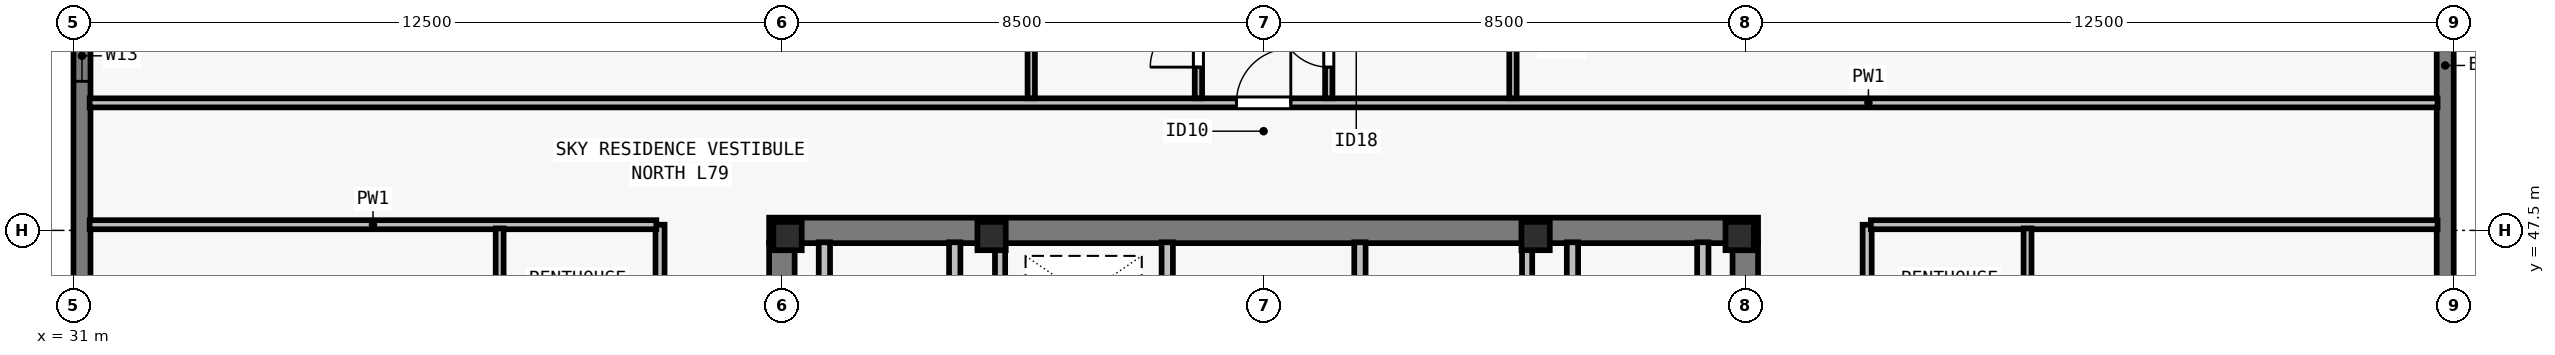
"""IFC4 building model, lengths in metres.
Left out: names, types, materials, properties, quantities, classifications, styles, units other than length and angle.
Written with IfcOpenShell. Run it as: python <this file> out.ifc"""

import sys

from ifc_helpers import new_model, si_unit, direction, frame, frame_2d, origin, origin_2d, place, context, subcontext, project, spatial, rectangle, i_section, extrude, element, fill, save


model = new_model("IFC4")
c1 = context("Model", 3, precision=1e-05, world=origin(), true_north=direction((0.0, 1.0)))
c2 = subcontext(c1, "Body", "Model", "MODEL_VIEW")
j1 = project(units=[si_unit("LENGTHUNIT", "METRE"), si_unit("PLANEANGLEUNIT", "RADIAN")], contexts=[c1])
p1 = place(None, origin())
s1 = spatial("IfcSite", under=j1, at=p1, CompositionType="ELEMENT")
p2 = place(p1, origin())
s2 = spatial("IfcBuilding", under=s1, at=p2, CompositionType="ELEMENT")
p3 = place(p2, frame((0.0, 0.0, 287.5)))
s3 = spatial("IfcBuildingStorey", under=s2, at=p3, CompositionType="ELEMENT", Elevation=287.5)
for number, where, z_axis, x_axis in (
    (1, (43.6, 47.4, 0.0), (0.0, 0.0, 1.0), (1.0, 0.0, 0.0)),
    (2, (47.2, 47.4, 0.0), (0.0, 0.0, 1.0), (1.0, 0.0, 0.0)),
    (3, (56.8, 47.4, 0.0), (0.0, 0.0, 1.0), (1.0, 0.0, 0.0)),
    (4, (60.4, 47.4, 0.0), (0.0, 0.0, 1.0), (1.0, 0.0, 0.0)),
):
    element("IfcColumn", number, at=place(p3, frame(where, z_axis=z_axis, x_axis=x_axis)), inside=s3, PredefinedType="COLUMN", context=c2, shape_type="SweptSolid", body=[
        extrude(i_section(OverallWidth=0.5, OverallDepth=0.5, WebThickness=0.028, FlangeThickness=0.045, at=origin_2d()), origin(), (0.0, 0.0, 1.0), 3.5),
    ])
p4 = place(p3, frame((31.15, 23.5, 0.0), z_axis=(0.0, 0.0, 1.0), x_axis=(0.0, 1.0, 0.0)))
e5 = element("IfcWall", 5, at=p4, inside=s3, PredefinedType="SOLIDWALL", context=c2, shape_type="SweptSolid", body=[
    extrude(rectangle(XDim=30.722, YDim=0.3, at=frame_2d((15.361, 0.0))), origin(), (0.0, 0.0, 1.0), 3.29),
])
p5 = place(p4, frame((8.331, 0.0, 0.8)))
e6 = element("IfcOpeningElement", 6, at=p5, cuts=e5, PredefinedType="OPENING", context=c2, shape_type="SweptSolid", body=[
    extrude(rectangle(XDim=1.65, YDim=1.758, at=frame_2d((0.825, 0.879))), frame((0.0, 0.16, 0.0), z_axis=(0.0, -1.0, 0.0), x_axis=(1.0, 0.0, 0.0)), (0.0, 0.0, 1.0), 0.32),
])
p6 = place(p4, frame((12.442, 0.0, 0.8)))
e7 = element("IfcOpeningElement", 7, at=p6, cuts=e5, PredefinedType="OPENING", context=c2, shape_type="SweptSolid", body=[
    extrude(rectangle(XDim=2.0, YDim=1.758, at=frame_2d((1.0, 0.879))), frame((0.0, 0.16, 0.0), z_axis=(0.0, -1.0, 0.0), x_axis=(1.0, 0.0, 0.0)), (0.0, 0.0, 1.0), 0.32),
])
p7 = place(p4, frame((17.304, 0.0, 0.8)))
e8 = element("IfcOpeningElement", 8, at=p7, cuts=e5, PredefinedType="OPENING", context=c2, shape_type="SweptSolid", body=[
    extrude(rectangle(XDim=1.65, YDim=1.758, at=frame_2d((0.825, 0.879))), frame((0.0, 0.16, 0.0), z_axis=(0.0, -1.0, 0.0), x_axis=(1.0, 0.0, 0.0)), (0.0, 0.0, 1.0), 0.32),
])
p8 = place(p4, frame((20.967, 0.0, 0.8)))
e9 = element("IfcOpeningElement", 9, at=p8, cuts=e5, PredefinedType="OPENING", context=c2, shape_type="SweptSolid", body=[
    extrude(rectangle(XDim=2.0, YDim=1.758, at=frame_2d((1.0, 0.879))), frame((0.0, 0.16, 0.0), z_axis=(0.0, -1.0, 0.0), x_axis=(1.0, 0.0, 0.0)), (0.0, 0.0, 1.0), 0.32),
])
p9 = place(p4, frame((26.63, 0.0, 0.8)))
e10 = element("IfcOpeningElement", 10, at=p9, cuts=e5, PredefinedType="OPENING", context=c2, shape_type="SweptSolid", body=[
    extrude(rectangle(XDim=0.9, YDim=1.75, at=frame_2d((0.45, 0.875))), frame((0.0, 0.16, 0.0), z_axis=(0.0, -1.0, 0.0), x_axis=(1.0, 0.0, 0.0)), (0.0, 0.0, 1.0), 0.32),
])
p10 = place(p3, frame((72.85, 54.5, 0.0), z_axis=(0.0, 0.0, 1.0), x_axis=(0.0, -1.0, 0.0)))
e11 = element("IfcWall", 11, at=p10, inside=s3, PredefinedType="SOLIDWALL", context=c2, shape_type="SweptSolid", body=[
    extrude(rectangle(XDim=30.722, YDim=0.3, at=frame_2d((15.361, 0.0))), origin(), (0.0, 0.0, 1.0), 3.29),
])
p11 = place(p10, frame((8.331, 0.0, 0.8)))
e12 = element("IfcOpeningElement", 12, at=p11, cuts=e11, PredefinedType="OPENING", context=c2, shape_type="SweptSolid", body=[
    extrude(rectangle(XDim=1.65, YDim=1.758, at=frame_2d((0.825, 0.879))), frame((0.0, 0.16, 0.0), z_axis=(0.0, -1.0, 0.0), x_axis=(1.0, 0.0, 0.0)), (0.0, 0.0, 1.0), 0.32),
])
p12 = place(p10, frame((11.593, 0.0, 0.8)))
e13 = element("IfcOpeningElement", 13, at=p12, cuts=e11, PredefinedType="OPENING", context=c2, shape_type="SweptSolid", body=[
    extrude(rectangle(XDim=2.0, YDim=1.758, at=frame_2d((1.0, 0.879))), frame((0.0, 0.16, 0.0), z_axis=(0.0, -1.0, 0.0), x_axis=(1.0, 0.0, 0.0)), (0.0, 0.0, 1.0), 0.32),
])
p13 = place(p10, frame((16.455, 0.0, 0.8)))
e14 = element("IfcOpeningElement", 14, at=p13, cuts=e11, PredefinedType="OPENING", context=c2, shape_type="SweptSolid", body=[
    extrude(rectangle(XDim=1.65, YDim=1.758, at=frame_2d((0.825, 0.879))), frame((0.0, 0.16, 0.0), z_axis=(0.0, -1.0, 0.0), x_axis=(1.0, 0.0, 0.0)), (0.0, 0.0, 1.0), 0.32),
])
p14 = place(p10, frame((20.967, 0.0, 0.8)))
e15 = element("IfcOpeningElement", 15, at=p14, cuts=e11, PredefinedType="OPENING", context=c2, shape_type="SweptSolid", body=[
    extrude(rectangle(XDim=2.0, YDim=1.758, at=frame_2d((1.0, 0.879))), frame((0.0, 0.16, 0.0), z_axis=(0.0, -1.0, 0.0), x_axis=(1.0, 0.0, 0.0)), (0.0, 0.0, 1.0), 0.32),
])
p15 = place(p3, frame((43.275, 47.5, 0.0), z_axis=(0.0, 0.0, 1.0), x_axis=(1.0, 0.0, 0.0)))
e16 = element("IfcWall", 16, at=p15, inside=s3, PredefinedType="SHEAR", context=c2, shape_type="SweptSolid", body=[
    extrude(rectangle(XDim=17.45, YDim=0.45, at=frame_2d((8.725, 0.0))), origin(), (0.0, 0.0, 1.0), 3.29),
])
for number, where, z_axis, x_axis in (
    (17, (43.5, 40.8, 0.0), (0.0, 0.0, 1.0), (0.0, 1.0, 0.0)),
    (18, (60.5, 40.8, 0.0), (0.0, 0.0, 1.0), (0.0, 1.0, 0.0)),
):
    element("IfcWall", number, at=place(p3, frame(where, z_axis=z_axis, x_axis=x_axis)), inside=s3, PredefinedType="SHEAR", context=c2, shape_type="SweptSolid", body=[
        extrude(rectangle(XDim=6.485, YDim=0.45, at=frame_2d((3.242, 0.0))), origin(), (0.0, 0.0, 1.0), 3.29),
    ])
p16 = place(p3, frame((50.3, 40.585, 0.0), z_axis=(0.0, 0.0, 1.0), x_axis=(0.0, 1.0, 0.0)))
e19 = element("IfcWall", 19, at=p16, inside=s3, PredefinedType="SOLIDWALL", context=c2, shape_type="SweptSolid", body=[
    extrude(rectangle(XDim=6.705, YDim=0.2, at=frame_2d((3.353, 0.0))), origin(), (0.0, 0.0, 1.0), 3.29),
])
p17 = place(p16, frame((0.515, 0.0, 0.0)))
e20 = element("IfcOpeningElement", 20, at=p17, cuts=e19, PredefinedType="OPENING", context=c2, shape_type="SweptSolid", body=[
    extrude(rectangle(XDim=1.1, YDim=2.2, at=frame_2d((0.55, 1.1))), frame((0.0, 0.11, 0.0), z_axis=(0.0, -1.0, 0.0), x_axis=(1.0, 0.0, 0.0)), (0.0, 0.0, 1.0), 0.22),
])
p18 = place(p16, frame((3.015, 0.0, 0.0)))
e21 = element("IfcOpeningElement", 21, at=p18, cuts=e19, PredefinedType="OPENING", context=c2, shape_type="SweptSolid", body=[
    extrude(rectangle(XDim=1.1, YDim=2.2, at=frame_2d((0.55, 1.1))), frame((0.0, 0.11, 0.0), z_axis=(0.0, -1.0, 0.0), x_axis=(1.0, 0.0, 0.0)), (0.0, 0.0, 1.0), 0.22),
])
p19 = place(p16, frame((5.065, 0.0, 0.0)))
e22 = element("IfcOpeningElement", 22, at=p19, cuts=e19, PredefinedType="OPENING", context=c2, shape_type="SweptSolid", body=[
    extrude(rectangle(XDim=0.8, YDim=2.08, at=frame_2d((0.4, 1.04))), frame((0.0, 0.11, 0.0), z_axis=(0.0, -1.0, 0.0), x_axis=(1.0, 0.0, 0.0)), (0.0, 0.0, 1.0), 0.22),
])
p20 = place(p3, frame((53.7, 40.585, 0.0), z_axis=(0.0, 0.0, 1.0), x_axis=(0.0, 1.0, 0.0)))
e23 = element("IfcWall", 23, at=p20, inside=s3, PredefinedType="SOLIDWALL", context=c2, shape_type="SweptSolid", body=[
    extrude(rectangle(XDim=6.705, YDim=0.2, at=frame_2d((3.353, 0.0))), origin(), (0.0, 0.0, 1.0), 3.29),
])
p21 = place(p20, frame((0.195, 0.0, 0.0)))
e24 = element("IfcOpeningElement", 24, at=p21, cuts=e23, PredefinedType="OPENING", context=c2, shape_type="SweptSolid", body=[
    extrude(rectangle(XDim=0.8, YDim=2.08, at=frame_2d((0.4, 1.04))), frame((0.0, 0.11, 0.0), z_axis=(0.0, -1.0, 0.0), x_axis=(1.0, 0.0, 0.0)), (0.0, 0.0, 1.0), 0.22),
])
p22 = place(p20, frame((1.865, 0.0, 0.0)))
e25 = element("IfcOpeningElement", 25, at=p22, cuts=e23, PredefinedType="OPENING", context=c2, shape_type="SweptSolid", body=[
    extrude(rectangle(XDim=1.1, YDim=2.2, at=frame_2d((0.55, 1.1))), frame((0.0, 0.11, 0.0), z_axis=(0.0, -1.0, 0.0), x_axis=(1.0, 0.0, 0.0)), (0.0, 0.0, 1.0), 0.22),
])
p23 = place(p20, frame((4.265, 0.0, 0.0)))
e26 = element("IfcOpeningElement", 26, at=p23, cuts=e23, PredefinedType="OPENING", context=c2, shape_type="SweptSolid", body=[
    extrude(rectangle(XDim=0.95, YDim=2.12, at=frame_2d((0.475, 1.06))), frame((0.0, 0.11, 0.0), z_axis=(0.0, -1.0, 0.0), x_axis=(1.0, 0.0, 0.0)), (0.0, 0.0, 1.0), 0.22),
])
for number, where, z_axis, x_axis in (
    (27, (46.55, 43.735, 0.0), (0.0, 0.0, 1.0), (0.0, 1.0, 0.0)),
    (28, (44.25, 43.735, 0.0), (0.0, 0.0, 1.0), (0.0, 1.0, 0.0)),
    (29, (57.45, 43.735, 0.0), (0.0, 0.0, 1.0), (0.0, 1.0, 0.0)),
    (30, (59.75, 43.735, 0.0), (0.0, 0.0, 1.0), (0.0, 1.0, 0.0)),
):
    element("IfcWall", number, at=place(p3, frame(where, z_axis=z_axis, x_axis=x_axis)), inside=s3, PredefinedType="SOLIDWALL", context=c2, shape_type="SweptSolid", body=[
        extrude(rectangle(XDim=3.555, YDim=0.2, at=frame_2d((1.777, 0.0))), origin(), (0.0, 0.0, 1.0), 3.29),
    ])
for number, where, z_axis, x_axis in (
    (31, (47.35, 43.735, 0.0), (0.0, 0.0, 1.0), (0.0, 1.0, 0.0)),
    (32, (56.65, 43.735, 0.0), (0.0, 0.0, 1.0), (0.0, 1.0, 0.0)),
):
    element("IfcWall", number, at=place(p3, frame(where, z_axis=z_axis, x_axis=x_axis)), inside=s3, PredefinedType="SOLIDWALL", context=c2, shape_type="SweptSolid", body=[
        extrude(rectangle(XDim=3.555, YDim=0.18, at=frame_2d((1.777, 0.0))), origin(), (0.0, 0.0, 1.0), 3.29),
    ])
p24 = place(p3, frame((31.285, 49.75, 0.0), z_axis=(0.0, 0.0, 1.0), x_axis=(1.0, 0.0, 0.0)))
e33 = element("IfcWall", 33, at=p24, inside=s3, PredefinedType="PARTITIONING", context=c2, shape_type="SweptSolid", body=[
    extrude(rectangle(XDim=41.43, YDim=0.16, at=frame_2d((20.715, 0.0))), origin(), (0.0, 0.0, 1.0), 3.009),
])
p25 = place(p24, frame((20.235, 0.0, 0.0)))
e34 = element("IfcOpeningElement", 34, at=p25, cuts=e33, PredefinedType="OPENING", context=c2, shape_type="SweptSolid", body=[
    extrude(rectangle(XDim=0.96, YDim=2.18, at=frame_2d((0.48, 1.09))), frame((0.0, 0.09, 0.0), z_axis=(0.0, -1.0, 0.0), x_axis=(1.0, 0.0, 0.0)), (0.0, 0.0, 1.0), 0.18),
])
p26 = place(p3, frame((41.35, 30.4, 0.0), z_axis=(0.0, 0.0, 1.0), x_axis=(0.0, 1.0, 0.0)))
e35 = element("IfcWall", 35, at=p26, inside=s3, PredefinedType="PARTITIONING", context=c2, shape_type="SweptSolid", body=[
    extrude(rectangle(XDim=17.2, YDim=0.16, at=frame_2d((8.6, 0.0))), origin(), (0.0, 0.0, 1.0), 3.009),
])
p27 = place(p26, frame((8.12, 0.0, 0.0)))
e36 = element("IfcOpeningElement", 36, at=p27, cuts=e35, PredefinedType="OPENING", context=c2, shape_type="SweptSolid", body=[
    extrude(rectangle(XDim=0.96, YDim=2.18, at=frame_2d((0.48, 1.09))), frame((0.0, 0.09, 0.0), z_axis=(0.0, -1.0, 0.0), x_axis=(1.0, 0.0, 0.0)), (0.0, 0.0, 1.0), 0.18),
])
p28 = place(p3, frame((62.65, 30.4, 0.0), z_axis=(0.0, 0.0, 1.0), x_axis=(0.0, 1.0, 0.0)))
e37 = element("IfcWall", 37, at=p28, inside=s3, PredefinedType="PARTITIONING", context=c2, shape_type="SweptSolid", body=[
    extrude(rectangle(XDim=17.2, YDim=0.16, at=frame_2d((8.6, 0.0))), origin(), (0.0, 0.0, 1.0), 3.29),
])
p29 = place(p28, frame((8.12, 0.0, 0.0)))
e38 = element("IfcOpeningElement", 38, at=p29, cuts=e37, PredefinedType="OPENING", context=c2, shape_type="SweptSolid", body=[
    extrude(rectangle(XDim=0.96, YDim=2.18, at=frame_2d((0.48, 1.09))), frame((0.0, 0.09, 0.0), z_axis=(0.0, -1.0, 0.0), x_axis=(1.0, 0.0, 0.0)), (0.0, 0.0, 1.0), 0.18),
])
for number, where, z_axis, x_axis in (
    (39, (31.285, 47.6, 0.0), (0.0, 0.0, 1.0), (1.0, 0.0, 0.0)),
    (40, (62.715, 47.6, 0.0), (0.0, 0.0, 1.0), (1.0, 0.0, 0.0)),
):
    element("IfcWall", number, at=place(p3, frame(where, z_axis=z_axis, x_axis=x_axis)), inside=s3, PredefinedType="PARTITIONING", context=c2, shape_type="SweptSolid", body=[
        extrude(rectangle(XDim=10.0, YDim=0.16, at=frame_2d((5.0, 0.0))), origin(), (0.0, 0.0, 1.0), 3.29),
    ])
p30 = place(p3, frame((47.9, 49.83, 0.0), z_axis=(0.0, 0.0, 1.0), x_axis=(0.0, 1.0, 0.0)))
e41 = element("IfcWall", 41, at=p30, inside=s3, PredefinedType="PLUMBINGWALL", context=c2, shape_type="SweptSolid", body=[
    extrude(rectangle(XDim=2.75, YDim=0.13, at=frame_2d((1.375, 0.0))), origin(), (0.0, 0.0, 1.0), 3.29),
])
p31 = place(p3, frame((50.85, 49.83, 0.0), z_axis=(0.0, 0.0, 1.0), x_axis=(0.0, 1.0, 0.0)))
e42 = element("IfcWall", 42, at=p31, inside=s3, PredefinedType="PLUMBINGWALL", context=c2, shape_type="SweptSolid", body=[
    extrude(rectangle(XDim=2.75, YDim=0.13, at=frame_2d((1.375, 0.0))), origin(), (0.0, 0.0, 1.0), 3.009),
])
p32 = place(p31, frame((0.55, 0.0, 0.0)))
e43 = element("IfcOpeningElement", 43, at=p32, cuts=e42, PredefinedType="OPENING", context=c2, shape_type="SweptSolid", body=[
    extrude(rectangle(XDim=0.85, YDim=2.08, at=frame_2d((0.425, 1.04))), frame((0.0, 0.075, 0.0), z_axis=(0.0, -1.0, 0.0), x_axis=(1.0, 0.0, 0.0)), (0.0, 0.0, 1.0), 0.15),
])
p33 = place(p3, frame((56.4, 49.83, 0.0), z_axis=(0.0, 0.0, 1.0), x_axis=(0.0, 1.0, 0.0)))
e44 = element("IfcWall", 44, at=p33, inside=s3, PredefinedType="PLUMBINGWALL", context=c2, shape_type="SweptSolid", body=[
    extrude(rectangle(XDim=2.75, YDim=0.13, at=frame_2d((1.375, 0.0))), origin(), (0.0, 0.0, 1.0), 3.29),
])
p34 = place(p3, frame((53.15, 49.83, 0.0), z_axis=(0.0, 0.0, 1.0), x_axis=(0.0, 1.0, 0.0)))
e45 = element("IfcWall", 45, at=p34, inside=s3, PredefinedType="PLUMBINGWALL", context=c2, shape_type="SweptSolid", body=[
    extrude(rectangle(XDim=2.75, YDim=0.13, at=frame_2d((1.375, 0.0))), origin(), (0.0, 0.0, 1.0), 3.29),
])
p35 = place(p34, frame((0.55, 0.0, 0.0)))
e46 = element("IfcOpeningElement", 46, at=p35, cuts=e45, PredefinedType="OPENING", context=c2, shape_type="SweptSolid", body=[
    extrude(rectangle(XDim=0.88, YDim=2.1, at=frame_2d((0.44, 1.05))), frame((0.0, 0.075, 0.0), z_axis=(0.0, -1.0, 0.0), x_axis=(1.0, 0.0, 0.0)), (0.0, 0.0, 1.0), 0.15),
])
p36 = place(p3, frame((38.52, 43.475, 0.0), z_axis=(0.0, 0.0, 1.0), x_axis=(0.0, 1.0, 0.0)))
e47 = element("IfcWall", 47, at=p36, inside=s3, PredefinedType="PARTITIONING", context=c2, shape_type="SweptSolid", body=[
    extrude(rectangle(XDim=4.06, YDim=0.14, at=frame_2d((2.03, 0.0))), origin(), (0.0, 0.0, 1.0), 3.29),
])
p37 = place(p36, frame((0.375, 0.0, 0.0)))
e48 = element("IfcOpeningElement", 48, at=p37, cuts=e47, PredefinedType="OPENING", context=c2, shape_type="SweptSolid", body=[
    extrude(rectangle(XDim=0.82, YDim=2.1, at=frame_2d((0.41, 1.05))), frame((0.0, 0.08, 0.0), z_axis=(0.0, -1.0, 0.0), x_axis=(1.0, 0.0, 0.0)), (0.0, 0.0, 1.0), 0.16),
])
p38 = place(p3, frame((65.48, 43.475, 0.0), z_axis=(0.0, 0.0, 1.0), x_axis=(0.0, 1.0, 0.0)))
e49 = element("IfcWall", 49, at=p38, inside=s3, PredefinedType="PARTITIONING", context=c2, shape_type="SweptSolid", body=[
    extrude(rectangle(XDim=4.06, YDim=0.14, at=frame_2d((2.03, 0.0))), origin(), (0.0, 0.0, 1.0), 3.29),
])
p39 = place(p38, frame((0.375, 0.0, 0.0)))
e50 = element("IfcOpeningElement", 50, at=p39, cuts=e49, PredefinedType="OPENING", context=c2, shape_type="SweptSolid", body=[
    extrude(rectangle(XDim=0.82, YDim=2.1, at=frame_2d((0.41, 1.05))), frame((0.0, 0.08, 0.0), z_axis=(0.0, -1.0, 0.0), x_axis=(1.0, 0.0, 0.0)), (0.0, 0.0, 1.0), 0.16),
])
p40 = place(p9, origin())
e51 = element("IfcWindow", 51, at=p40, inside=s3, PartitioningType="SINGLE_PANEL", PredefinedType="WINDOW", context=c2, shape_type="SweptSolid", body=[
    extrude(rectangle(XDim=0.9, YDim=1.75, at=frame_2d((0.45, 0.875))), frame((0.0, -0.04, 0.0), z_axis=(0.0, -1.0, 0.0), x_axis=(1.0, 0.0, 0.0)), (0.0, 0.0, 1.0), 0.06),
])
fill(e10, e51)
p41 = place(p32, origin())
e52 = element("IfcDoor", 52, at=p41, inside=s3, OperationType="SINGLE_SWING_LEFT", PredefinedType="DOOR", context=c2, shape_type="SweptSolid", body=[
    extrude(rectangle(XDim=0.85, YDim=2.08, at=frame_2d((0.425, 1.04))), frame((0.0, 0.025, 0.0), z_axis=(0.0, -1.0, 0.0), x_axis=(1.0, 0.0, 0.0)), (0.0, 0.0, 1.0), 0.05),
])
fill(e43, e52)
p42 = place(p35, origin())
e53 = element("IfcDoor", 53, at=p42, inside=s3, OperationType="SINGLE_SWING_RIGHT", PredefinedType="DOOR", context=c2, shape_type="SweptSolid", body=[
    extrude(rectangle(XDim=0.88, YDim=2.1, at=frame_2d((0.44, 1.05))), frame((0.0, 0.025, 0.0), z_axis=(0.0, -1.0, 0.0), x_axis=(1.0, 0.0, 0.0)), (0.0, 0.0, 1.0), 0.05),
])
fill(e46, e53)
p43 = place(p25, origin())
e54 = element("IfcDoor", 54, at=p43, inside=s3, OperationType="SINGLE_SWING_RIGHT", PredefinedType="DOOR", context=c2, shape_type="SweptSolid", body=[
    extrude(rectangle(XDim=0.96, YDim=2.18, at=frame_2d((0.48, 1.09))), frame((0.0, 0.025, 0.0), z_axis=(0.0, -1.0, 0.0), x_axis=(1.0, 0.0, 0.0)), (0.0, 0.0, 1.0), 0.05),
])
fill(e34, e54)
save(model, sys.argv[1])
